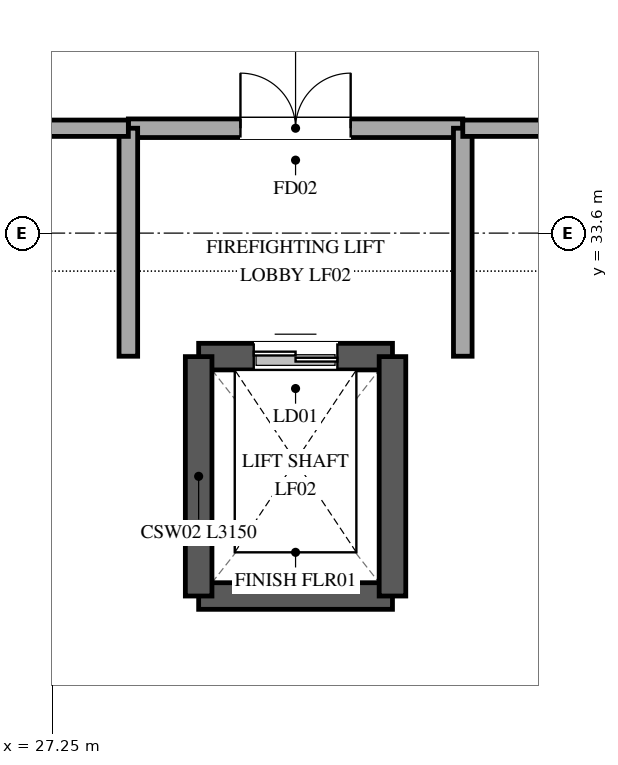
"""IFC4 building model, lengths in metres.
Left out: names, types, materials, properties, quantities, classifications, styles, units other than length and angle.
Written with IfcOpenShell. Run it as: python <this file> out.ifc"""

import sys

from ifc_helpers import new_model, si_unit, direction, frame, frame_2d, origin, place, context, subcontext, project, spatial, rectangle, extrude, element, fill, save


model = new_model("IFC4")
c1 = context("Model", 3, precision=1e-05, world=origin(), true_north=direction((0.0, 1.0)))
c2 = subcontext(c1, "Body", "Model", "MODEL_VIEW")
j1 = project(units=[si_unit("LENGTHUNIT", "METRE"), si_unit("PLANEANGLEUNIT", "RADIAN")], contexts=[c1])
p1 = place(None, origin())
s1 = spatial("IfcSite", under=j1, at=p1, CompositionType="ELEMENT")
p2 = place(p1, origin())
s2 = spatial("IfcBuilding", under=s1, at=p2, CompositionType="ELEMENT")
p3 = place(p2, origin())
s3 = spatial("IfcBuildingStorey", under=s2, at=p3, CompositionType="ELEMENT", Elevation=0.0)
p4 = place(p3, frame((29.175, 31.975, 0.0), z_axis=(0.0, 0.0, 1.0), x_axis=(1.0, 0.0, 0.0)))
e1 = element("IfcWall", 1, at=p4, inside=s3, PredefinedType="SHEAR", context=c2, shape_type="SweptSolid", body=[
    extrude(rectangle(XDim=2.55, YDim=0.35, at=frame_2d((1.275, 0.0))), origin(), (0.0, 0.0, 1.0), 6.0),
])
p5 = place(p4, frame((0.725, 0.0, 0.0)))
e2 = element("IfcOpeningElement", 2, at=p5, cuts=e1, PredefinedType="OPENING", context=c2, shape_type="SweptSolid", body=[
    extrude(rectangle(XDim=1.1, YDim=2.2, at=frame_2d((0.55, 1.1))), frame((0.0, 0.185, 0.0), z_axis=(0.0, -1.0, 0.0), x_axis=(1.0, 0.0, 0.0)), (0.0, 0.0, 1.0), 0.37),
])
p6 = place(p3, frame((31.725, 28.825, 0.0), z_axis=(0.0, 0.0, 1.0), x_axis=(-1.0, 0.0, 0.0)))
e3 = element("IfcWall", 3, at=p6, inside=s3, PredefinedType="SHEAR", context=c2, shape_type="SweptSolid", body=[
    extrude(rectangle(XDim=2.55, YDim=0.35, at=frame_2d((1.275, 0.0))), origin(), (0.0, 0.0, 1.0), 6.0),
])
for number, where, z_axis, x_axis in (
    (4, (29.175, 28.825, 0.0), (0.0, 0.0, 1.0), (0.0, 1.0, 0.0)),
    (5, (31.725, 31.975, 0.0), (0.0, 0.0, 1.0), (0.0, -1.0, 0.0)),
):
    element("IfcWall", number, at=place(p3, frame(where, z_axis=z_axis, x_axis=x_axis)), inside=s3, PredefinedType="SHEAR", context=c2, shape_type="SweptSolid", body=[
        extrude(rectangle(XDim=3.15, YDim=0.35, at=frame_2d((1.575, 0.0))), origin(), (0.0, 0.0, 1.0), 6.0),
    ])
p7 = place(p3, frame((28.25, 34.98, 0.0), z_axis=(0.0, 0.0, 1.0), x_axis=(1.0, 0.0, 0.0)))
e6 = element("IfcWall", 6, at=p7, inside=s3, PredefinedType="STANDARD", context=c2, shape_type="SweptSolid", body=[
    extrude(rectangle(XDim=4.4, YDim=0.245, at=frame_2d((2.2, 0.0))), origin(), (0.0, 0.0, 1.0), 5.66),
])
p8 = place(p7, frame((1.475, 0.0, 0.0)))
e7 = element("IfcOpeningElement", 7, at=p8, cuts=e6, PredefinedType="OPENING", context=c2, shape_type="SweptSolid", body=[
    extrude(rectangle(XDim=1.45, YDim=2.2, at=frame_2d((0.725, 1.1))), frame((0.0, 0.133, 0.0), z_axis=(0.0, -1.0, 0.0), x_axis=(1.0, 0.0, 0.0)), (0.0, 0.0, 1.0), 0.265),
])
for number, where, z_axis, x_axis in (
    (8, (28.25, 31.98, 0.0), (0.0, 0.0, 1.0), (0.0, 1.0, 0.0)),
    (9, (32.65, 34.98, 0.0), (0.0, 0.0, 1.0), (0.0, -1.0, 0.0)),
):
    element("IfcWall", number, at=place(p3, frame(where, z_axis=z_axis, x_axis=x_axis)), inside=s3, PredefinedType="STANDARD", context=c2, shape_type="SweptSolid", body=[
        extrude(rectangle(XDim=3.0, YDim=0.245, at=frame_2d((1.5, 0.0))), origin(), (0.0, 0.0, 1.0), 4.91),
    ])
p9 = place(p3, frame((28.25, 34.98, 0.0), z_axis=(0.0, 0.0, 1.0), x_axis=(-1.0, 0.0, 0.0)))
e10 = element("IfcWall", 10, at=p9, inside=s3, PredefinedType="PARTITIONING", context=c2, shape_type="SweptSolid", body=[
    extrude(rectangle(XDim=11.59, YDim=0.215, at=frame_2d((5.795, 0.0))), origin(), (0.0, 0.0, 1.0), 4.91),
])
p10 = place(p3, frame((35.6, 34.98, 0.0), z_axis=(0.0, 0.0, 1.0), x_axis=(-1.0, 0.0, 0.0)))
e11 = element("IfcWall", 11, at=p10, inside=s3, PredefinedType="PARTITIONING", context=c2, shape_type="SweptSolid", body=[
    extrude(rectangle(XDim=2.95, YDim=0.215, at=frame_2d((1.475, 0.0))), origin(), (0.0, 0.0, 1.0), 4.91),
])
p11 = place(p5, origin())
e12 = element("IfcDoor", 12, at=p11, inside=s3, OperationType="DOUBLE_DOOR_SLIDING", PredefinedType="DOOR", context=c2, shape_type="SweptSolid", body=[
    extrude(rectangle(XDim=1.1, YDim=2.2, at=frame_2d((0.55, 1.1))), frame((0.0, 0.025, 0.0), z_axis=(0.0, -1.0, 0.0), x_axis=(1.0, 0.0, 0.0)), (0.0, 0.0, 1.0), 0.05),
])
fill(e2, e12)
p12 = place(p8, origin())
e13 = element("IfcDoor", 13, at=p12, inside=s3, OperationType="DOUBLE_DOOR_SINGLE_SWING", PredefinedType="DOOR", context=c2, shape_type="SweptSolid", body=[
    extrude(rectangle(XDim=1.45, YDim=2.2, at=frame_2d((0.725, 1.1))), frame((0.0, 0.025, 0.0), z_axis=(0.0, -1.0, 0.0), x_axis=(1.0, 0.0, 0.0)), (0.0, 0.0, 1.0), 0.05),
])
fill(e7, e13)
save(model, sys.argv[1])
